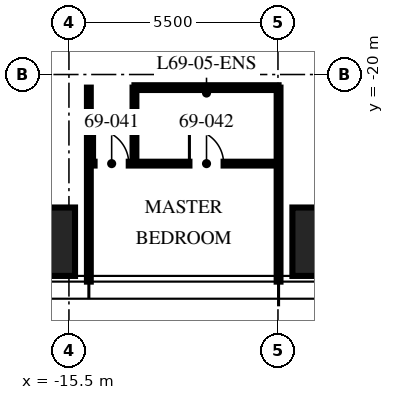
"""IFC4 building model, lengths in metres.
Left out: names, types, materials, properties, quantities, classifications, styles, units other than length and angle.
Written with IfcOpenShell. Run it as: python <this file> out.ifc"""

import sys

from ifc_helpers import new_model, si_unit, direction, frame, frame_2d, origin, origin_2d, place, context, subcontext, project, spatial, rectangle, hollow_rectangle, extrude, element, fill, save


model = new_model("IFC4")
c1 = context("Model", 3, precision=1e-05, world=origin(), true_north=direction((0.0, 1.0)))
c2 = subcontext(c1, "Body", "Model", "MODEL_VIEW")
j1 = project(units=[si_unit("LENGTHUNIT", "METRE"), si_unit("PLANEANGLEUNIT", "RADIAN")], contexts=[c1])
p1 = place(None, origin())
s1 = spatial("IfcSite", under=j1, at=p1, CompositionType="ELEMENT")
p2 = place(p1, origin())
s2 = spatial("IfcBuilding", under=s1, at=p2, CompositionType="ELEMENT")
p3 = place(p2, frame((0.0, 0.0, 274.5)))
s3 = spatial("IfcBuildingStorey", under=s2, at=p3, CompositionType="ELEMENT", Elevation=274.5)
p4 = place(p3, frame((-8.32, -24.4, 0.0), z_axis=(0.0, 0.0, 1.0), x_axis=(1.0, 0.0, 0.0)))
e1 = element("IfcColumn", 1, at=p4, inside=s3, PredefinedType="COLUMN", context=c2, shape_type="SweptSolid", body=[
    extrude(hollow_rectangle(XDim=2.6, YDim=1.8, WallThickness=0.14, at=origin_2d()), origin(), (0.0, 0.0, 1.0), 2.64),
])
p5 = place(p3, frame((-16.64, -24.4, 0.0), z_axis=(0.0, 0.0, 1.0), x_axis=(1.0, 0.0, 0.0)))
e2 = element("IfcColumn", 2, at=p5, inside=s3, PredefinedType="COLUMN", context=c2, shape_type="SweptSolid", body=[
    extrude(hollow_rectangle(XDim=2.6, YDim=1.8, WallThickness=0.14, at=origin_2d()), origin(), (0.0, 0.0, 1.0), 2.51),
])
for number, where, z_axis, x_axis in (
    (3, (-14.976, -20.345, 0.0), (0.0, 0.0, 1.0), (0.0, -1.0, 0.0)),
    (4, (-9.984, -20.345, 0.0), (0.0, 0.0, 1.0), (0.0, -1.0, 0.0)),
):
    element("IfcWall", number, at=place(p3, frame(where, z_axis=z_axis, x_axis=x_axis)), inside=s3, PredefinedType="PARTITIONING", context=c2, shape_type="SweptSolid", body=[
        extrude(rectangle(XDim=5.105, YDim=0.1, at=frame_2d((2.552, 0.0))), origin(), (0.0, 0.0, 1.0), 2.75),
    ])
p6 = place(p3, frame((-14.976, -22.345, 0.0), z_axis=(0.0, 0.0, 1.0), x_axis=(1.0, 0.0, 0.0)))
e5 = element("IfcWall", 5, at=p6, inside=s3, PredefinedType="PARTITIONING", context=c2, shape_type="SweptSolid", body=[
    extrude(rectangle(XDim=4.992, YDim=0.1, at=frame_2d((2.496, 0.0))), origin(), (0.0, 0.0, 1.0), 2.2),
])
p7 = place(p6, frame((0.15, 0.0, 0.0)))
e6 = element("IfcOpeningElement", 6, at=p7, cuts=e5, PredefinedType="OPENING", context=c2, shape_type="SweptSolid", body=[
    extrude(rectangle(XDim=0.9, YDim=2.1, at=frame_2d((0.45, 1.05))), frame((0.0, 0.06, 0.0), z_axis=(0.0, -1.0, 0.0), x_axis=(1.0, 0.0, 0.0)), (0.0, 0.0, 1.0), 0.12),
])
p8 = place(p6, frame((2.646, 0.0, 0.0)))
e7 = element("IfcOpeningElement", 7, at=p8, cuts=e5, PredefinedType="OPENING", context=c2, shape_type="SweptSolid", body=[
    extrude(rectangle(XDim=0.9, YDim=2.1, at=frame_2d((0.45, 1.05))), frame((0.0, 0.06, 0.0), z_axis=(0.0, -1.0, 0.0), x_axis=(1.0, 0.0, 0.0)), (0.0, 0.0, 1.0), 0.12),
])
p9 = place(p3, frame((-13.776, -20.345, 0.0), z_axis=(0.0, 0.0, 1.0), x_axis=(0.0, -1.0, 0.0)))
e8 = element("IfcWall", 8, at=p9, inside=s3, PredefinedType="PARTITIONING", context=c2, shape_type="SweptSolid", body=[
    extrude(rectangle(XDim=2.0, YDim=0.1, at=frame_2d((1.0, 0.0))), origin(), (0.0, 0.0, 1.0), 3.4),
])
p10 = place(p3, frame((-13.776, -20.345, 0.0), z_axis=(0.0, 0.0, 1.0), x_axis=(1.0, 0.0, 0.0)))
e9 = element("IfcWall", 9, at=p10, inside=s3, PredefinedType="PARTITIONING", context=c2, shape_type="SweptSolid", body=[
    extrude(rectangle(XDim=3.792, YDim=0.125, at=frame_2d((1.896, 0.0))), origin(), (0.0, 0.0, 1.0), 2.2),
])
p11 = place(p7, origin())
e10 = element("IfcDoor", 10, at=p11, inside=s3, OperationType="SINGLE_SWING_LEFT", PredefinedType="DOOR", context=c2, shape_type="SweptSolid", body=[
    extrude(rectangle(XDim=0.9, YDim=2.1, at=frame_2d((0.45, 1.05))), frame((0.0, 0.025, 0.0), z_axis=(0.0, -1.0, 0.0), x_axis=(1.0, 0.0, 0.0)), (0.0, 0.0, 1.0), 0.05),
])
fill(e6, e10)
p12 = place(p8, origin())
e11 = element("IfcDoor", 11, at=p12, inside=s3, OperationType="SINGLE_SWING_LEFT", PredefinedType="DOOR", context=c2, shape_type="SweptSolid", body=[
    extrude(rectangle(XDim=0.9, YDim=2.1, at=frame_2d((0.45, 1.05))), frame((0.0, 0.025, 0.0), z_axis=(0.0, -1.0, 0.0), x_axis=(1.0, 0.0, 0.0)), (0.0, 0.0, 1.0), 0.05),
])
fill(e7, e11)
save(model, sys.argv[1])
